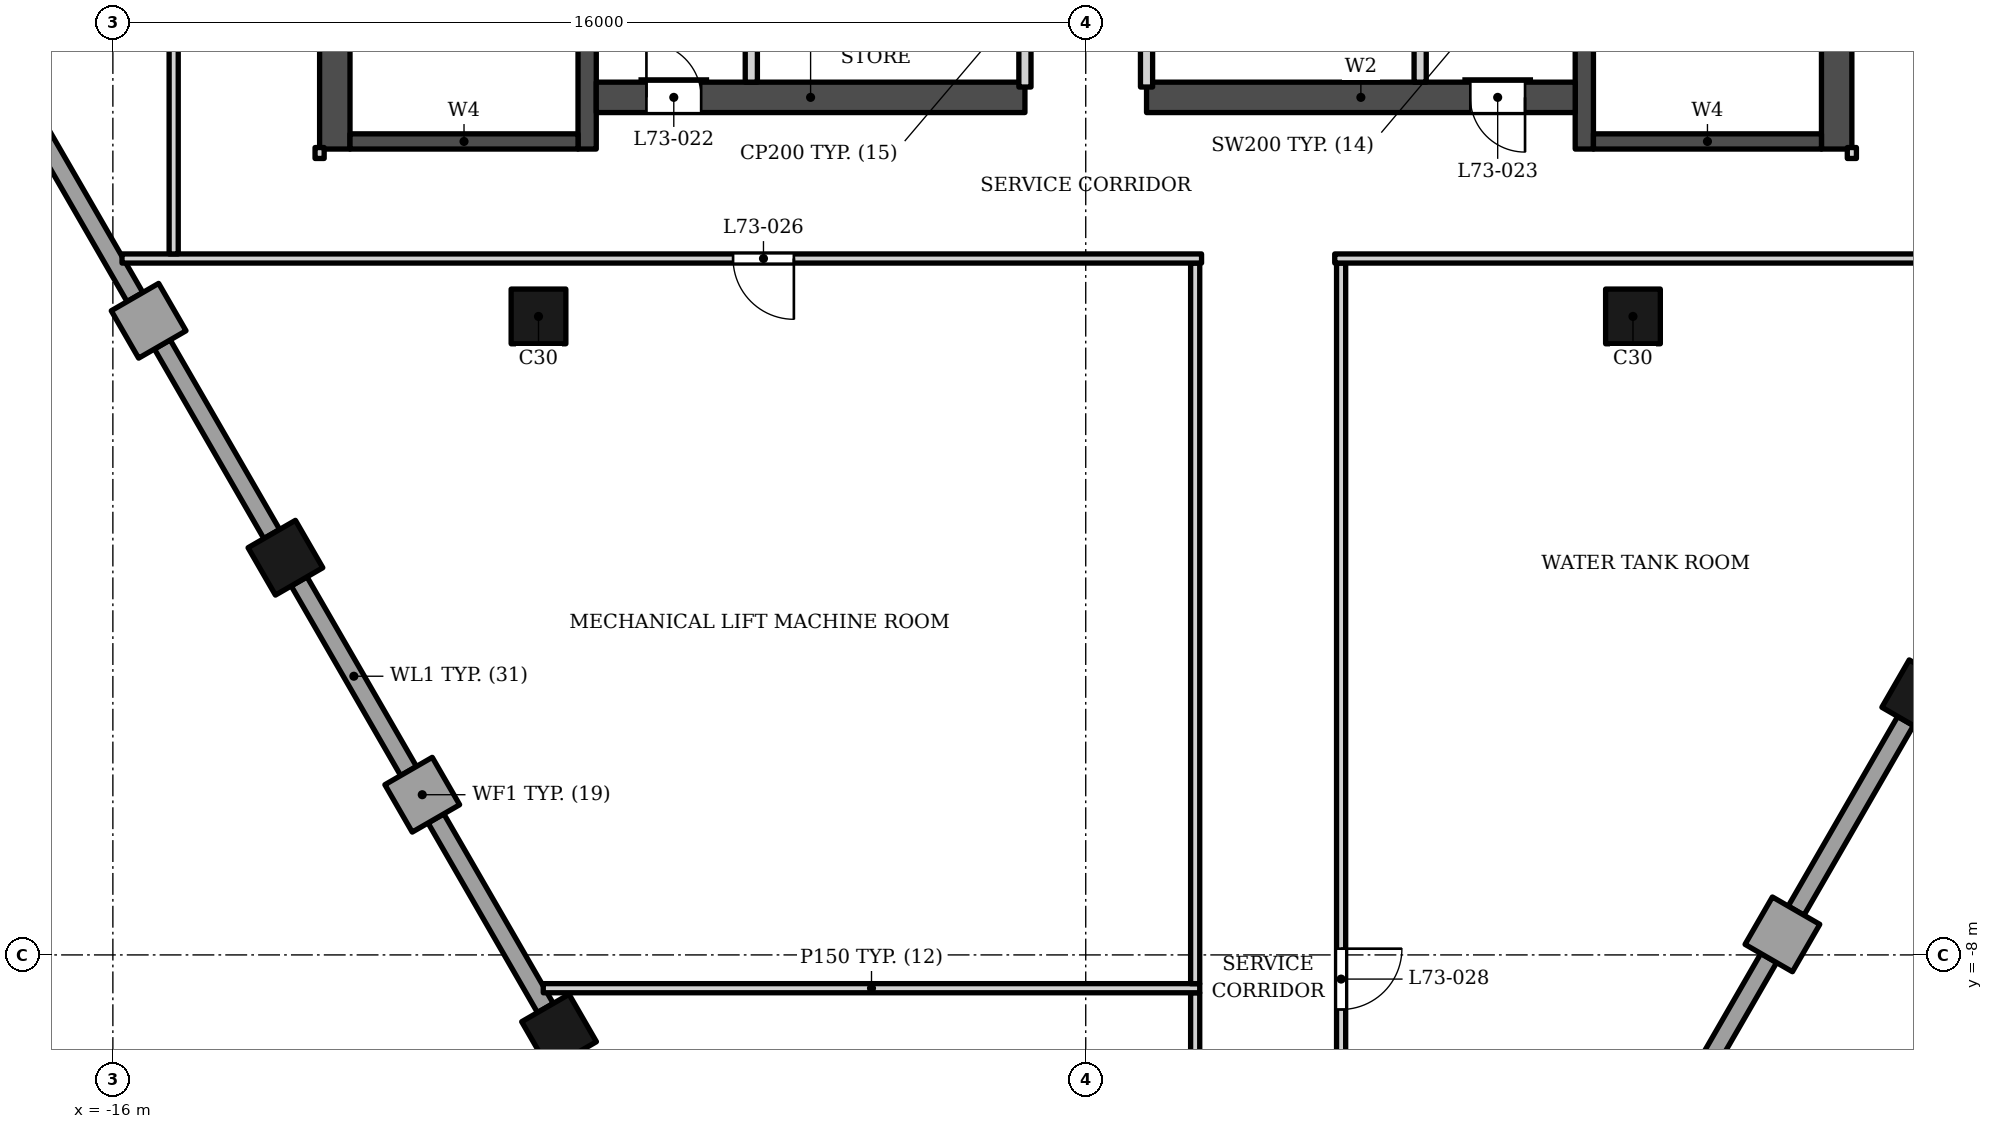
"""IFC4 building model, lengths in metres.
Left out: names, types, materials, properties, quantities, classifications, styles, units other than length and angle.
Written with IfcOpenShell. Run it as: python <this file> out.ifc"""

import sys

from ifc_helpers import new_model, si_unit, direction, frame, frame_2d, origin, origin_2d, place, context, subcontext, project, spatial, polyline, rectangle, outline, extrude, element, fill, save


model = new_model("IFC4")
c1 = context("Model", 3, precision=1e-05, world=origin(), true_north=direction((0.0, 1.0)))
c2 = subcontext(c1, "Body", "Model", "MODEL_VIEW")
j1 = project(units=[si_unit("LENGTHUNIT", "METRE"), si_unit("PLANEANGLEUNIT", "RADIAN")], contexts=[c1])
p1 = place(None, origin())
s1 = spatial("IfcSite", under=j1, at=p1, CompositionType="ELEMENT")
p2 = place(p1, origin())
s2 = spatial("IfcBuilding", under=s1, at=p2, CompositionType="ELEMENT")
p3 = place(p2, frame((0.0, 0.0, 310.5)))
s3 = spatial("IfcBuildingStorey", under=s2, at=p3, CompositionType="ELEMENT", Elevation=310.5)
p4 = place(p3, frame((-12.35, 5.253, 0.0), z_axis=(0.0, 0.0, 1.0), x_axis=(0.0, 1.0, 0.0)))
e1 = element("IfcWall", 1, at=p4, inside=s3, PredefinedType="SHEAR", context=c2, shape_type="SweptSolid", body=[
    extrude(rectangle(XDim=13.8, YDim=0.5, at=frame_2d((6.9, 0.0))), origin(), (0.0, 0.0, 1.0), 5.0),
])
p5 = place(p4, frame((7.2, 0.0, 0.0)))
e2 = element("IfcOpeningElement", 2, at=p5, cuts=e1, PredefinedType="OPENING", context=c2, shape_type="SweptSolid", body=[
    extrude(rectangle(XDim=1.2, YDim=2.1, at=frame_2d((0.6, 1.05))), frame((0.0, 0.26, 0.0), z_axis=(0.0, -1.0, 0.0), x_axis=(1.0, 0.0, 0.0)), (0.0, 0.0, 1.0), 0.52),
])
p6 = place(p4, frame((5.15, 0.0, 0.0)))
e3 = element("IfcOpeningElement", 3, at=p6, cuts=e1, PredefinedType="OPENING", context=c2, shape_type="SweptSolid", body=[
    extrude(rectangle(XDim=1.2, YDim=2.1, at=frame_2d((0.6, 1.05))), frame((0.0, 0.26, 0.0), z_axis=(0.0, -1.0, 0.0), x_axis=(1.0, 0.0, 0.0)), (0.0, 0.0, 1.0), 0.52),
])
p7 = place(p3, frame((-8.2, 5.253, 0.0), z_axis=(0.0, 0.0, 1.0), x_axis=(0.0, 1.0, 0.0)))
e4 = element("IfcWall", 4, at=p7, inside=s3, PredefinedType="SHEAR", context=c2, shape_type="SweptSolid", body=[
    extrude(rectangle(XDim=13.3, YDim=0.3, at=frame_2d((6.65, 0.0))), origin(), (0.0, 0.0, 1.0), 5.0),
])
p8 = place(p7, frame((7.1, 0.0, 0.0)))
e5 = element("IfcOpeningElement", 5, at=p8, cuts=e4, PredefinedType="OPENING", context=c2, shape_type="SweptSolid", body=[
    extrude(rectangle(XDim=1.4, YDim=2.1, at=frame_2d((0.7, 1.05))), frame((0.0, 0.16, 0.0), z_axis=(0.0, -1.0, 0.0), x_axis=(1.0, 0.0, 0.0)), (0.0, 0.0, 1.0), 0.32),
])
p9 = place(p7, frame((5.05, 0.0, 0.0)))
e6 = element("IfcOpeningElement", 6, at=p9, cuts=e4, PredefinedType="OPENING", context=c2, shape_type="SweptSolid", body=[
    extrude(rectangle(XDim=1.4, YDim=2.1, at=frame_2d((0.7, 1.05))), frame((0.0, 0.16, 0.0), z_axis=(0.0, -1.0, 0.0), x_axis=(1.0, 0.0, 0.0)), (0.0, 0.0, 1.0), 0.32),
])
p10 = place(p3, frame((-12.1, 5.378, 0.0), z_axis=(0.0, 0.0, 1.0), x_axis=(1.0, 0.0, 0.0)))
e7 = element("IfcWall", 7, at=p10, inside=s3, PredefinedType="SHEAR", context=c2, shape_type="SweptSolid", body=[
    extrude(rectangle(XDim=3.75, YDim=0.25, at=frame_2d((1.875, 0.0))), origin(), (0.0, 0.0, 1.0), 5.0),
])
p11 = place(p3, frame((12.35, 5.253, 0.0), z_axis=(0.0, 0.0, 1.0), x_axis=(0.0, 1.0, 0.0)))
e8 = element("IfcWall", 8, at=p11, inside=s3, PredefinedType="SHEAR", context=c2, shape_type="SweptSolid", body=[
    extrude(rectangle(XDim=13.8, YDim=0.5, at=frame_2d((6.9, 0.0))), origin(), (0.0, 0.0, 1.0), 5.0),
])
p12 = place(p11, frame((7.2, 0.0, 0.0)))
e9 = element("IfcOpeningElement", 9, at=p12, cuts=e8, PredefinedType="OPENING", context=c2, shape_type="SweptSolid", body=[
    extrude(rectangle(XDim=1.2, YDim=2.1, at=frame_2d((0.6, 1.05))), frame((0.0, 0.26, 0.0), z_axis=(0.0, -1.0, 0.0), x_axis=(1.0, 0.0, 0.0)), (0.0, 0.0, 1.0), 0.52),
])
p13 = place(p11, frame((5.15, 0.0, 0.0)))
e10 = element("IfcOpeningElement", 10, at=p13, cuts=e8, PredefinedType="OPENING", context=c2, shape_type="SweptSolid", body=[
    extrude(rectangle(XDim=1.2, YDim=2.1, at=frame_2d((0.6, 1.05))), frame((0.0, 0.26, 0.0), z_axis=(0.0, -1.0, 0.0), x_axis=(1.0, 0.0, 0.0)), (0.0, 0.0, 1.0), 0.52),
])
p14 = place(p3, frame((8.2, 5.253, 0.0), z_axis=(0.0, 0.0, 1.0), x_axis=(0.0, 1.0, 0.0)))
e11 = element("IfcWall", 11, at=p14, inside=s3, PredefinedType="SHEAR", context=c2, shape_type="SweptSolid", body=[
    extrude(rectangle(XDim=13.3, YDim=0.3, at=frame_2d((6.65, 0.0))), origin(), (0.0, 0.0, 1.0), 5.0),
])
p15 = place(p14, frame((7.1, 0.0, 0.0)))
e12 = element("IfcOpeningElement", 12, at=p15, cuts=e11, PredefinedType="OPENING", context=c2, shape_type="SweptSolid", body=[
    extrude(rectangle(XDim=1.4, YDim=2.1, at=frame_2d((0.7, 1.05))), frame((0.0, 0.16, 0.0), z_axis=(0.0, -1.0, 0.0), x_axis=(1.0, 0.0, 0.0)), (0.0, 0.0, 1.0), 0.32),
])
p16 = place(p14, frame((5.05, 0.0, 0.0)))
e13 = element("IfcOpeningElement", 13, at=p16, cuts=e11, PredefinedType="OPENING", context=c2, shape_type="SweptSolid", body=[
    extrude(rectangle(XDim=1.4, YDim=2.1, at=frame_2d((0.7, 1.05))), frame((0.0, 0.16, 0.0), z_axis=(0.0, -1.0, 0.0), x_axis=(1.0, 0.0, 0.0)), (0.0, 0.0, 1.0), 0.32),
])
p17 = place(p3, frame((8.35, 5.378, 0.0), z_axis=(0.0, 0.0, 1.0), x_axis=(1.0, 0.0, 0.0)))
e14 = element("IfcWall", 14, at=p17, inside=s3, PredefinedType="SHEAR", context=c2, shape_type="SweptSolid", body=[
    extrude(rectangle(XDim=3.75, YDim=0.25, at=frame_2d((1.875, 0.0))), origin(), (0.0, 0.0, 1.0), 5.0),
])
p18 = place(p3, frame((-8.05, 6.103, 0.0), z_axis=(0.0, 0.0, 1.0), x_axis=(1.0, 0.0, 0.0)))
e15 = element("IfcWall", 15, at=p18, inside=s3, PredefinedType="SHEAR", context=c2, shape_type="SweptSolid", body=[
    extrude(rectangle(XDim=7.05, YDim=0.5, at=frame_2d((3.525, 0.0))), origin(), (0.0, 0.0, 1.0), 5.0),
])
p19 = place(p18, frame((0.825, 0.0, 0.0)))
e16 = element("IfcOpeningElement", 16, at=p19, cuts=e15, PredefinedType="OPENING", context=c2, shape_type="SweptSolid", body=[
    extrude(rectangle(XDim=0.9, YDim=2.1, at=frame_2d((0.45, 1.05))), frame((0.0, 0.26, 0.0), z_axis=(0.0, -1.0, 0.0), x_axis=(1.0, 0.0, 0.0)), (0.0, 0.0, 1.0), 0.52),
])
p20 = place(p3, frame((1.0, 6.103, 0.0), z_axis=(0.0, 0.0, 1.0), x_axis=(1.0, 0.0, 0.0)))
e17 = element("IfcWall", 17, at=p20, inside=s3, PredefinedType="SHEAR", context=c2, shape_type="SweptSolid", body=[
    extrude(rectangle(XDim=7.05, YDim=0.5, at=frame_2d((3.525, 0.0))), origin(), (0.0, 0.0, 1.0), 5.0),
])
p21 = place(p20, frame((5.325, 0.0, 0.0)))
e18 = element("IfcOpeningElement", 18, at=p21, cuts=e17, PredefinedType="OPENING", context=c2, shape_type="SweptSolid", body=[
    extrude(rectangle(XDim=0.9, YDim=2.1, at=frame_2d((0.45, 1.05))), frame((0.0, 0.26, 0.0), z_axis=(0.0, -1.0, 0.0), x_axis=(1.0, 0.0, 0.0)), (0.0, 0.0, 1.0), 0.52),
])
for number, where, z_axis, x_axis in (
    (19, (-9.0, 2.5, 0.0), (0.0, 0.0, 1.0), (1.0, 0.0, 0.0)),
    (20, (9.0, 2.5, 0.0), (0.0, 0.0, 1.0), (1.0, 0.0, 0.0)),
    (21, (-13.162, -1.468, 0.0), (0.0, 0.0, 1.0), (0.5, -0.866, 0.0)),
    (22, (-8.662, -9.263, 0.0), (0.0, 0.0, 1.0), (0.5, -0.866, 0.0)),
    (23, (13.708, -3.763, 0.0), (0.0, 0.0, 1.0), (0.5, 0.866, 0.0)),
):
    element("IfcColumn", number, at=place(p3, frame(where, z_axis=z_axis, x_axis=x_axis)), inside=s3, PredefinedType="COLUMN", context=c2, shape_type="SweptSolid", body=[
        extrude(rectangle(XDim=0.9, YDim=0.9, at=origin_2d()), origin(), (0.0, 0.0, 1.0), 5.0),
    ])
for number, where, z_axis, x_axis in (
    (24, (-15.022, 2.654, 0.0), (0.0, 0.0, 1.0), (-0.866, -0.5, 0.0)),
    (25, (-11.137, -4.976, 0.0), (0.0, 0.0, 1.0), (0.5, -0.866, 0.0)),
):
    element("IfcWall", number, at=place(p3, frame(where, z_axis=z_axis, x_axis=x_axis)), inside=s3, PredefinedType="SOLIDWALL", context=c2, shape_type="SweptSolid", body=[
        extrude(rectangle(XDim=0.9, YDim=0.9, at=frame_2d((0.45, 0.0))), origin(), (0.0, 0.0, 1.0), 3.8),
    ])
p22 = place(p3, frame((-17.437, 5.936, 0.0), z_axis=(0.0, 0.0, 1.0), x_axis=(0.499961193289, -0.866047807691, 0.0)))
e26 = element("IfcWall", 26, at=p22, inside=s3, PredefinedType="ELEMENTEDWALL", context=c2, shape_type="SweptSolid", body=[
    extrude(rectangle(XDim=3.6, YDim=0.3, at=frame_2d((1.8, 0.0))), origin(), (0.0, 0.0, 1.0), 3.8),
])
p23 = place(p3, origin())
e27 = element("IfcWall", 27, at=p23, inside=s3, PredefinedType="ELEMENTEDWALL", context=c2, shape_type="SweptSolid", body=[
    extrude(outline(polyline([(-15.317, 1.964), (-13.517, -1.153), (-13.257, -1.003), (-15.057, 2.114), (-15.317, 1.964)])), origin(), (0.0, 0.0, 1.0), 3.8),
])
for number, where, z_axis, x_axis in (
    (28, (-12.937, -1.858, 0.0), (0.0, 0.0, 1.0), (0.5, -0.866, 0.0)),
    (29, (-10.687, -5.755, 0.0), (0.0, 0.0, 1.0), (0.5, -0.866, 0.0)),
):
    element("IfcWall", number, at=place(p3, frame(where, z_axis=z_axis, x_axis=x_axis)), inside=s3, PredefinedType="ELEMENTEDWALL", context=c2, shape_type="SweptSolid", body=[
        extrude(rectangle(XDim=3.6, YDim=0.3, at=frame_2d((1.8, 0.0))), origin(), (0.0, 0.0, 1.0), 3.8),
    ])
p24 = place(p3, frame((11.068, -7.437, 0.0), z_axis=(0.0, 0.0, 1.0), x_axis=(0.866081705922, -0.499902469156, 0.0)))
e30 = element("IfcWall", 30, at=p24, inside=s3, PredefinedType="SOLIDWALL", context=c2, shape_type="SweptSolid", body=[
    extrude(rectangle(XDim=0.9, YDim=0.9, at=frame_2d((0.45, 0.0))), origin(), (0.0, 0.0, 1.0), 3.8),
])
for number, where, z_axis, x_axis in (
    (31, (9.433, -11.169, 0.0), (0.0, 0.0, 1.0), (0.5, 0.866, 0.0)),
    (32, (11.683, -7.272, 0.0), (0.0, 0.0, 1.0), (0.5, 0.866, 0.0)),
):
    element("IfcWall", number, at=place(p3, frame(where, z_axis=z_axis, x_axis=x_axis)), inside=s3, PredefinedType="ELEMENTEDWALL", context=c2, shape_type="SweptSolid", body=[
        extrude(rectangle(XDim=3.6, YDim=0.3, at=frame_2d((1.8, 0.0))), origin(), (0.0, 0.0, 1.0), 3.8),
    ])
for number, where, z_axis, x_axis in (
    (33, (-1.0, 6.273, 0.0), (0.0, 0.0, 1.0), (0.0, 1.0, 0.0)),
    (34, (1.0, 6.273, 0.0), (0.0, 0.0, 1.0), (0.0, 1.0, 0.0)),
):
    element("IfcWall", number, at=place(p3, frame(where, z_axis=z_axis, x_axis=x_axis)), inside=s3, PredefinedType="PARTITIONING", context=c2, shape_type="SweptSolid", body=[
        extrude(rectangle(XDim=2.88, YDim=0.2, at=frame_2d((1.44, 0.0))), origin(), (0.0, 0.0, 1.0), 4.8),
    ])
p25 = place(p3, frame((-5.5, 6.353, 0.0), z_axis=(0.0, 0.0, 1.0), x_axis=(0.0, 1.0, 0.0)))
e35 = element("IfcWall", 35, at=p25, inside=s3, PredefinedType="SOLIDWALL", context=c2, shape_type="SweptSolid", body=[
    extrude(rectangle(XDim=7.85, YDim=0.2, at=frame_2d((3.925, 0.0))), origin(), (0.0, 0.0, 1.0), 4.8),
])
p26 = place(p25, frame((3.6, 0.0, 0.0)))
e36 = element("IfcOpeningElement", 36, at=p26, cuts=e35, PredefinedType="OPENING", context=c2, shape_type="SweptSolid", body=[
    extrude(rectangle(XDim=1.4, YDim=2.1, at=frame_2d((0.7, 1.05))), frame((0.0, 0.11, 0.0), z_axis=(0.0, -1.0, 0.0), x_axis=(1.0, 0.0, 0.0)), (0.0, 0.0, 1.0), 0.22),
])
p27 = place(p3, frame((5.5, 6.353, 0.0), z_axis=(0.0, 0.0, 1.0), x_axis=(0.0, 1.0, 0.0)))
e37 = element("IfcWall", 37, at=p27, inside=s3, PredefinedType="SOLIDWALL", context=c2, shape_type="SweptSolid", body=[
    extrude(rectangle(XDim=7.85, YDim=0.2, at=frame_2d((3.925, 0.0))), origin(), (0.0, 0.0, 1.0), 4.8),
])
p28 = place(p27, frame((3.6, 0.0, 0.0)))
e38 = element("IfcOpeningElement", 38, at=p28, cuts=e37, PredefinedType="OPENING", context=c2, shape_type="SweptSolid", body=[
    extrude(rectangle(XDim=1.4, YDim=2.1, at=frame_2d((0.7, 1.05))), frame((0.0, 0.11, 0.0), z_axis=(0.0, -1.0, 0.0), x_axis=(1.0, 0.0, 0.0)), (0.0, 0.0, 1.0), 0.22),
])
p29 = place(p3, frame((1.8, -20.872, 0.0), z_axis=(0.0, 0.0, 1.0), x_axis=(0.0, 1.0, 0.0)))
e39 = element("IfcWall", 39, at=p29, inside=s3, PredefinedType="PARTITIONING", context=c2, shape_type="SweptSolid", body=[
    extrude(rectangle(XDim=12.25, YDim=0.15, at=frame_2d((6.125, 0.0))), origin(), (0.0, 0.0, 1.0), 4.02),
])
p30 = place(p29, frame((5.525, 0.0, 0.0)))
e40 = element("IfcOpeningElement", 40, at=p30, cuts=e39, PredefinedType="OPENING", context=c2, shape_type="SweptSolid", body=[
    extrude(rectangle(XDim=1.0, YDim=2.1, at=frame_2d((0.5, 1.05))), frame((0.0, 0.085, 0.0), z_axis=(0.0, -1.0, 0.0), x_axis=(1.0, 0.0, 0.0)), (0.0, 0.0, 1.0), 0.17),
])
p31 = place(p3, frame((4.2, -19.6, 0.0), z_axis=(0.0, 0.0, 1.0), x_axis=(0.0, 1.0, 0.0)))
e41 = element("IfcWall", 41, at=p31, inside=s3, PredefinedType="PARTITIONING", context=c2, shape_type="SweptSolid", body=[
    extrude(rectangle(XDim=22.977, YDim=0.15, at=frame_2d((11.489, 0.0))), origin(), (0.0, 0.0, 1.0), 4.02),
])
p32 = place(p31, frame((10.702, 0.0, 0.0)))
e42 = element("IfcOpeningElement", 42, at=p32, cuts=e41, PredefinedType="OPENING", context=c2, shape_type="SweptSolid", body=[
    extrude(rectangle(XDim=1.0, YDim=2.1, at=frame_2d((0.5, 1.05))), frame((0.0, 0.085, 0.0), z_axis=(0.0, -1.0, 0.0), x_axis=(1.0, 0.0, 0.0)), (0.0, 0.0, 1.0), 0.17),
])
p33 = place(p3, frame((-8.922, -8.547, 0.0), z_axis=(0.0, 0.0, 1.0), x_axis=(1.0, 0.0, 0.0)))
e43 = element("IfcWall", 43, at=p33, inside=s3, PredefinedType="PARTITIONING", context=c2, shape_type="SweptSolid", body=[
    extrude(rectangle(XDim=10.797, YDim=0.15, at=frame_2d((5.398, 0.0))), origin(), (0.0, 0.0, 1.0), 3.812),
])
p34 = place(p3, frame((1.8, -8.472, 0.0), z_axis=(0.0, 0.0, 1.0), x_axis=(0.0, 1.0, 0.0)))
e44 = element("IfcWall", 44, at=p34, inside=s3, PredefinedType="PARTITIONING", context=c2, shape_type="SweptSolid", body=[
    extrude(rectangle(XDim=11.85, YDim=0.15, at=frame_2d((5.925, 0.0))), origin(), (0.0, 0.0, 1.0), 4.8),
])
p35 = place(p3, frame((-15.85, 3.453, 0.0), z_axis=(0.0, 0.0, 1.0), x_axis=(1.0, 0.0, 0.0)))
e45 = element("IfcWall", 45, at=p35, inside=s3, PredefinedType="PARTITIONING", context=c2, shape_type="SweptSolid", body=[
    extrude(rectangle(XDim=17.755, YDim=0.15, at=frame_2d((8.877, 0.0))), origin(), (0.0, 0.0, 1.0), 3.812),
])
p36 = place(p35, frame((10.05, 0.0, 0.0)))
e46 = element("IfcOpeningElement", 46, at=p36, cuts=e45, PredefinedType="OPENING", context=c2, shape_type="SweptSolid", body=[
    extrude(rectangle(XDim=1.0, YDim=2.1, at=frame_2d((0.5, 1.05))), frame((0.0, 0.085, 0.0), z_axis=(0.0, -1.0, 0.0), x_axis=(1.0, 0.0, 0.0)), (0.0, 0.0, 1.0), 0.17),
])
p37 = place(p3, frame((4.095, 3.453, 0.0), z_axis=(0.0, 0.0, 1.0), x_axis=(1.0, 0.0, 0.0)))
e47 = element("IfcWall", 47, at=p37, inside=s3, PredefinedType="PARTITIONING", context=c2, shape_type="SweptSolid", body=[
    extrude(rectangle(XDim=13.627, YDim=0.15, at=frame_2d((6.813, 0.0))), origin(), (0.0, 0.0, 1.0), 3.954),
])
p38 = place(p3, frame((-15.0, 3.528, 0.0), z_axis=(0.0, 0.0, 1.0), x_axis=(0.0, 1.0, 0.0)))
e48 = element("IfcWall", 48, at=p38, inside=s3, PredefinedType="PARTITIONING", context=c2, shape_type="SweptSolid", body=[
    extrude(rectangle(XDim=15.395, YDim=0.15, at=frame_2d((7.698, 0.0))), origin(), (0.0, 0.0, 1.0), 4.02),
])
p39 = place(p38, frame((7.275, 0.0, 0.0)))
e49 = element("IfcOpeningElement", 49, at=p39, cuts=e48, PredefinedType="OPENING", context=c2, shape_type="SweptSolid", body=[
    extrude(rectangle(XDim=1.0, YDim=2.1, at=frame_2d((0.5, 1.05))), frame((0.0, 0.085, 0.0), z_axis=(0.0, -1.0, 0.0), x_axis=(1.0, 0.0, 0.0)), (0.0, 0.0, 1.0), 0.17),
])
for number, where, z_axis, x_axis in (
    (50, (-12.6, 5.098, 0.0), (0.0, 0.0, 1.0), (0.0, 1.0, 0.0)),
    (51, (12.6, 5.098, 0.0), (0.0, 0.0, 1.0), (0.0, 1.0, 0.0)),
):
    element("IfcWall", number, at=place(p3, frame(where, z_axis=z_axis, x_axis=x_axis)), inside=s3, PredefinedType="PARTITIONING", context=c2, shape_type="SweptSolid", body=[
        extrude(rectangle(XDim=0.18, YDim=0.15, at=frame_2d((0.09, 0.0))), origin(), (0.0, 0.0, 1.0), 4.8),
    ])
p40 = place(p19, origin())
e52 = element("IfcDoor", 52, at=p40, inside=s3, OperationType="SINGLE_SWING_LEFT", PredefinedType="DOOR", context=c2, shape_type="SweptSolid", body=[
    extrude(rectangle(XDim=0.9, YDim=2.1, at=frame_2d((0.45, 1.05))), frame((0.0, 0.025, 0.0), z_axis=(0.0, -1.0, 0.0), x_axis=(1.0, 0.0, 0.0)), (0.0, 0.0, 1.0), 0.05),
])
fill(e16, e52)
p41 = place(p21, origin())
e53 = element("IfcDoor", 53, at=p41, inside=s3, OperationType="SINGLE_SWING_RIGHT", PredefinedType="DOOR", context=c2, shape_type="SweptSolid", body=[
    extrude(rectangle(XDim=0.9, YDim=2.1, at=frame_2d((0.45, 1.05))), frame((0.0, 0.025, 0.0), z_axis=(0.0, -1.0, 0.0), x_axis=(1.0, 0.0, 0.0)), (0.0, 0.0, 1.0), 0.05),
])
fill(e18, e53)
p42 = place(p36, origin())
e54 = element("IfcDoor", 54, at=p42, inside=s3, OperationType="SINGLE_SWING_RIGHT", PredefinedType="DOOR", context=c2, shape_type="SweptSolid", body=[
    extrude(rectangle(XDim=1.0, YDim=2.1, at=frame_2d((0.5, 1.05))), frame((0.0, 0.025, 0.0), z_axis=(0.0, -1.0, 0.0), x_axis=(1.0, 0.0, 0.0)), (0.0, 0.0, 1.0), 0.05),
])
fill(e46, e54)
p43 = place(p32, origin())
e55 = element("IfcDoor", 55, at=p43, inside=s3, OperationType="SINGLE_SWING_RIGHT", PredefinedType="DOOR", context=c2, shape_type="SweptSolid", body=[
    extrude(rectangle(XDim=1.0, YDim=2.1, at=frame_2d((0.5, 1.05))), frame((0.0, 0.025, 0.0), z_axis=(0.0, -1.0, 0.0), x_axis=(1.0, 0.0, 0.0)), (0.0, 0.0, 1.0), 0.05),
])
fill(e42, e55)
save(model, sys.argv[1])
